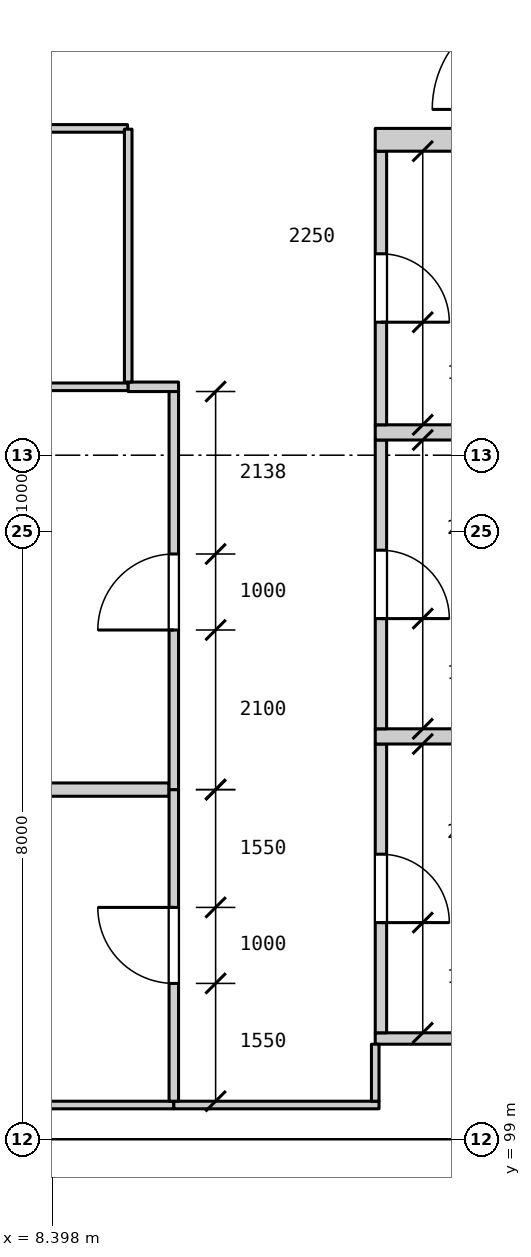
"""IFC4 building model, lengths in metres.
Left out: names, types, materials, properties, quantities, classifications, styles, units other than length and angle.
Written with IfcOpenShell. Run it as: python <this file> out.ifc"""

import sys

from ifc_helpers import new_model, si_unit, direction, frame, frame_2d, origin, place, context, subcontext, project, spatial, rectangle, extrude, element, fill, save


model = new_model("IFC4")
c1 = context("Model", 3, precision=1e-05, world=origin(), true_north=direction((0.0, 1.0)))
c2 = subcontext(c1, "Body", "Model", "MODEL_VIEW")
j1 = project(units=[si_unit("LENGTHUNIT", "METRE"), si_unit("PLANEANGLEUNIT", "RADIAN")], contexts=[c1])
p1 = place(None, origin())
s1 = spatial("IfcSite", under=j1, at=p1, CompositionType="ELEMENT")
p2 = place(p1, origin())
s2 = spatial("IfcBuilding", under=s1, at=p2, CompositionType="ELEMENT")
p3 = place(p2, frame((0.0, 0.0, 6.0)))
s3 = spatial("IfcBuildingStorey", under=s2, at=p3, CompositionType="ELEMENT", Elevation=6.0)
p4 = place(p3, frame((12.65, 100.325, 0.0), z_axis=(0.0, 0.0, 1.0), x_axis=(1.0, 0.0, 0.0)))
e1 = element("IfcWall", 1, at=p4, inside=s3, PredefinedType="PARTITIONING", context=c2, shape_type="SweptSolid", body=[
    extrude(rectangle(XDim=1.95, YDim=0.15, at=frame_2d((0.975, 0.0))), origin(), (0.0, 0.0, 1.0), 3.9),
])
p5 = place(p3, frame((12.725, 100.4, 0.0), z_axis=(0.0, 0.0, 1.0), x_axis=(0.0, 1.0, 0.0)))
e2 = element("IfcWall", 2, at=p5, inside=s3, PredefinedType="PARTITIONING", context=c2, shape_type="SweptSolid", body=[
    extrude(rectangle(XDim=3.8, YDim=0.15, at=frame_2d((1.9, 0.0))), origin(), (0.0, 0.0, 1.0), 3.9),
])
p6 = place(p5, frame((1.45, 0.0, 0.0)))
e3 = element("IfcOpeningElement", 3, at=p6, cuts=e2, PredefinedType="OPENING", context=c2, shape_type="SweptSolid", body=[
    extrude(rectangle(XDim=0.9, YDim=2.1, at=frame_2d((0.45, 1.05))), frame((0.0, 0.085, 0.0), z_axis=(0.0, -1.0, 0.0), x_axis=(1.0, 0.0, 0.0)), (0.0, 0.0, 1.0), 0.17),
])
p7 = place(p3, frame((12.65, 104.3, 0.0), z_axis=(0.0, 0.0, 1.0), x_axis=(1.0, 0.0, 0.0)))
e4 = element("IfcWall", 4, at=p7, inside=s3, PredefinedType="PARTITIONING", context=c2, shape_type="SweptSolid", body=[
    extrude(rectangle(XDim=1.95, YDim=0.2, at=frame_2d((0.975, 0.0))), origin(), (0.0, 0.0, 1.0), 3.9),
])
p8 = place(p3, frame((12.725, 104.4, 0.0), z_axis=(0.0, 0.0, 1.0), x_axis=(0.0, 1.0, 0.0)))
e5 = element("IfcWall", 5, at=p8, inside=s3, PredefinedType="PARTITIONING", context=c2, shape_type="SweptSolid", body=[
    extrude(rectangle(XDim=3.8, YDim=0.15, at=frame_2d((1.9, 0.0))), origin(), (0.0, 0.0, 1.0), 3.9),
])
p9 = place(p8, frame((1.45, 0.0, 0.0)))
e6 = element("IfcOpeningElement", 6, at=p9, cuts=e5, PredefinedType="OPENING", context=c2, shape_type="SweptSolid", body=[
    extrude(rectangle(XDim=0.9, YDim=2.1, at=frame_2d((0.45, 1.05))), frame((0.0, 0.085, 0.0), z_axis=(0.0, -1.0, 0.0), x_axis=(1.0, 0.0, 0.0)), (0.0, 0.0, 1.0), 0.17),
])
p10 = place(p3, frame((12.65, 108.3, 0.0), z_axis=(0.0, 0.0, 1.0), x_axis=(1.0, 0.0, 0.0)))
e7 = element("IfcWall", 7, at=p10, inside=s3, PredefinedType="PARTITIONING", context=c2, shape_type="SweptSolid", body=[
    extrude(rectangle(XDim=1.95, YDim=0.2, at=frame_2d((0.975, 0.0))), origin(), (0.0, 0.0, 1.0), 3.9),
])
p11 = place(p3, frame((12.725, 108.4, 0.0), z_axis=(0.0, 0.0, 1.0), x_axis=(0.0, 1.0, 0.0)))
e8 = element("IfcWall", 8, at=p11, inside=s3, PredefinedType="PARTITIONING", context=c2, shape_type="SweptSolid", body=[
    extrude(rectangle(XDim=3.6, YDim=0.15, at=frame_2d((1.8, 0.0))), origin(), (0.0, 0.0, 1.0), 3.9),
])
p12 = place(p11, frame((1.35, 0.0, 0.0)))
e9 = element("IfcOpeningElement", 9, at=p12, cuts=e8, PredefinedType="OPENING", context=c2, shape_type="SweptSolid", body=[
    extrude(rectangle(XDim=0.9, YDim=2.1, at=frame_2d((0.45, 1.05))), frame((0.0, 0.085, 0.0), z_axis=(0.0, -1.0, 0.0), x_axis=(1.0, 0.0, 0.0)), (0.0, 0.0, 1.0), 0.17),
])
p13 = place(p3, frame((12.65, 112.15, 0.0), z_axis=(0.0, 0.0, 1.0), x_axis=(1.0, 0.0, 0.0)))
e10 = element("IfcWall", 10, at=p13, inside=s3, PredefinedType="PARTITIONING", context=c2, shape_type="SweptSolid", body=[
    extrude(rectangle(XDim=1.95, YDim=0.3, at=frame_2d((0.975, 0.0))), origin(), (0.0, 0.0, 1.0), 3.9),
])
p14 = place(p3, frame((8.2, 99.45, 0.0), z_axis=(0.0, 0.0, 1.0), x_axis=(1.0, 0.0, 0.0)))
e11 = element("IfcWall", 11, at=p14, inside=s3, PredefinedType="PARTITIONING", context=c2, shape_type="SweptSolid", body=[
    extrude(rectangle(XDim=1.8, YDim=0.1, at=frame_2d((0.9, 0.0))), origin(), (0.0, 0.0, 1.0), 3.9),
])
p15 = place(p3, frame((10.0, 99.45, 0.0), z_axis=(0.0, 0.0, 1.0), x_axis=(1.0, 0.0, 0.0)))
e12 = element("IfcWall", 12, at=p15, inside=s3, PredefinedType="PARTITIONING", context=c2, shape_type="SweptSolid", body=[
    extrude(rectangle(XDim=2.7, YDim=0.1, at=frame_2d((1.35, 0.0))), origin(), (0.0, 0.0, 1.0), 3.9),
])
p16 = place(p3, frame((0.3, 103.6, 0.0), z_axis=(0.0, 0.0, 1.0), x_axis=(1.0, 0.0, 0.0)))
e13 = element("IfcWall", 13, at=p16, inside=s3, PredefinedType="PARTITIONING", context=c2, shape_type="SweptSolid", body=[
    extrude(rectangle(XDim=9.637, YDim=0.175, at=frame_2d((4.819, 0.0))), origin(), (0.0, 0.0, 1.0), 3.9),
])
p17 = place(p3, frame((0.3, 108.9, 0.0), z_axis=(0.0, 0.0, 1.0), x_axis=(1.0, 0.0, 0.0)))
e14 = element("IfcWall", 14, at=p17, inside=s3, PredefinedType="PARTITIONING", context=c2, shape_type="SweptSolid", body=[
    extrude(rectangle(XDim=9.1, YDim=0.1, at=frame_2d((4.55, 0.0))), origin(), (0.0, 0.0, 1.0), 3.9),
])
p18 = place(p3, frame((9.4, 108.9, 0.0), z_axis=(0.0, 0.0, 1.0), x_axis=(1.0, 0.0, 0.0)))
e15 = element("IfcWall", 15, at=p18, inside=s3, PredefinedType="PARTITIONING", context=c2, shape_type="SweptSolid", body=[
    extrude(rectangle(XDim=0.663, YDim=0.125, at=frame_2d((0.331, 0.0))), origin(), (0.0, 0.0, 1.0), 3.9),
])
p19 = place(p3, frame((6.3, 112.3, 0.0), z_axis=(0.0, 0.0, 1.0), x_axis=(1.0, 0.0, 0.0)))
e16 = element("IfcWall", 16, at=p19, inside=s3, PredefinedType="PARTITIONING", context=c2, shape_type="SweptSolid", body=[
    extrude(rectangle(XDim=3.09, YDim=0.1, at=frame_2d((1.545, 0.0))), origin(), (0.0, 0.0, 1.0), 3.9),
])
p20 = place(p3, frame((9.4, 108.962, 0.0), z_axis=(0.0, 0.0, 1.0), x_axis=(0.0, 1.0, 0.0)))
e17 = element("IfcWall", 17, at=p20, inside=s3, PredefinedType="PARTITIONING", context=c2, shape_type="SweptSolid", body=[
    extrude(rectangle(XDim=3.328, YDim=0.1, at=frame_2d((1.664, 0.0))), origin(), (0.0, 0.0, 1.0), 3.9),
])
p21 = place(p3, frame((10.0, 99.5, 0.0), z_axis=(0.0, 0.0, 1.0), x_axis=(0.0, 1.0, 0.0)))
e18 = element("IfcWall", 18, at=p21, inside=s3, PredefinedType="PARTITIONING", context=c2, shape_type="SweptSolid", body=[
    extrude(rectangle(XDim=4.1, YDim=0.125, at=frame_2d((2.05, 0.0))), origin(), (0.0, 0.0, 1.0), 3.9),
])
p22 = place(p21, frame((1.55, 0.0, 0.0)))
e19 = element("IfcOpeningElement", 19, at=p22, cuts=e18, PredefinedType="OPENING", context=c2, shape_type="SweptSolid", body=[
    extrude(rectangle(XDim=1.0, YDim=2.1, at=frame_2d((0.5, 1.05))), frame((0.0, 0.073, 0.0), z_axis=(0.0, -1.0, 0.0), x_axis=(1.0, 0.0, 0.0)), (0.0, 0.0, 1.0), 0.145),
])
p23 = place(p3, frame((10.0, 103.6, 0.0), z_axis=(0.0, 0.0, 1.0), x_axis=(0.0, 1.0, 0.0)))
e20 = element("IfcWall", 20, at=p23, inside=s3, PredefinedType="PARTITIONING", context=c2, shape_type="SweptSolid", body=[
    extrude(rectangle(XDim=5.237, YDim=0.125, at=frame_2d((2.619, 0.0))), origin(), (0.0, 0.0, 1.0), 3.9),
])
p24 = place(p23, frame((2.1, 0.0, 0.0)))
e21 = element("IfcOpeningElement", 21, at=p24, cuts=e20, PredefinedType="OPENING", context=c2, shape_type="SweptSolid", body=[
    extrude(rectangle(XDim=1.0, YDim=2.1, at=frame_2d((0.5, 1.05))), frame((0.0, 0.073, 0.0), z_axis=(0.0, -1.0, 0.0), x_axis=(1.0, 0.0, 0.0)), (0.0, 0.0, 1.0), 0.145),
])
p25 = place(p3, frame((12.65, 99.5, 0.0), z_axis=(0.0, 0.0, 1.0), x_axis=(0.0, 1.0, 0.0)))
e22 = element("IfcWall", 22, at=p25, inside=s3, PredefinedType="PARTITIONING", context=c2, shape_type="SweptSolid", body=[
    extrude(rectangle(XDim=0.75, YDim=0.1, at=frame_2d((0.375, 0.0))), origin(), (0.0, 0.0, 1.0), 3.9),
])
p26 = place(p22, origin())
e23 = element("IfcDoor", 23, at=p26, inside=s3, OperationType="SINGLE_SWING_RIGHT", PredefinedType="DOOR", context=c2, shape_type="SweptSolid", body=[
    extrude(rectangle(XDim=1.0, YDim=2.1, at=frame_2d((0.5, 1.05))), frame((0.0, 0.025, 0.0), z_axis=(0.0, -1.0, 0.0), x_axis=(1.0, 0.0, 0.0)), (0.0, 0.0, 1.0), 0.05),
])
fill(e19, e23)
p27 = place(p6, frame((0.9, 0.0, 0.0), z_axis=(0.0, 0.0, 1.0), x_axis=(-1.0, 0.0, 0.0)))
e24 = element("IfcDoor", 24, at=p27, inside=s3, OperationType="SINGLE_SWING_RIGHT", PredefinedType="DOOR", context=c2, shape_type="SweptSolid", body=[
    extrude(rectangle(XDim=0.9, YDim=2.1, at=frame_2d((0.45, 1.05))), frame((0.0, 0.025, 0.0), z_axis=(0.0, -1.0, 0.0), x_axis=(1.0, 0.0, 0.0)), (0.0, 0.0, 1.0), 0.05),
])
fill(e3, e24)
p28 = place(p24, origin())
e25 = element("IfcDoor", 25, at=p28, inside=s3, OperationType="SINGLE_SWING_LEFT", PredefinedType="DOOR", context=c2, shape_type="SweptSolid", body=[
    extrude(rectangle(XDim=1.0, YDim=2.1, at=frame_2d((0.5, 1.05))), frame((0.0, 0.025, 0.0), z_axis=(0.0, -1.0, 0.0), x_axis=(1.0, 0.0, 0.0)), (0.0, 0.0, 1.0), 0.05),
])
fill(e21, e25)
p29 = place(p9, frame((0.9, 0.0, 0.0), z_axis=(0.0, 0.0, 1.0), x_axis=(-1.0, 0.0, 0.0)))
e26 = element("IfcDoor", 26, at=p29, inside=s3, OperationType="SINGLE_SWING_RIGHT", PredefinedType="DOOR", context=c2, shape_type="SweptSolid", body=[
    extrude(rectangle(XDim=0.9, YDim=2.1, at=frame_2d((0.45, 1.05))), frame((0.0, 0.025, 0.0), z_axis=(0.0, -1.0, 0.0), x_axis=(1.0, 0.0, 0.0)), (0.0, 0.0, 1.0), 0.05),
])
fill(e6, e26)
p30 = place(p12, frame((0.9, 0.0, 0.0), z_axis=(0.0, 0.0, 1.0), x_axis=(-1.0, 0.0, 0.0)))
e27 = element("IfcDoor", 27, at=p30, inside=s3, OperationType="SINGLE_SWING_RIGHT", PredefinedType="DOOR", context=c2, shape_type="SweptSolid", body=[
    extrude(rectangle(XDim=0.9, YDim=2.1, at=frame_2d((0.45, 1.05))), frame((0.0, 0.025, 0.0), z_axis=(0.0, -1.0, 0.0), x_axis=(1.0, 0.0, 0.0)), (0.0, 0.0, 1.0), 0.05),
])
fill(e9, e27)
save(model, sys.argv[1])
